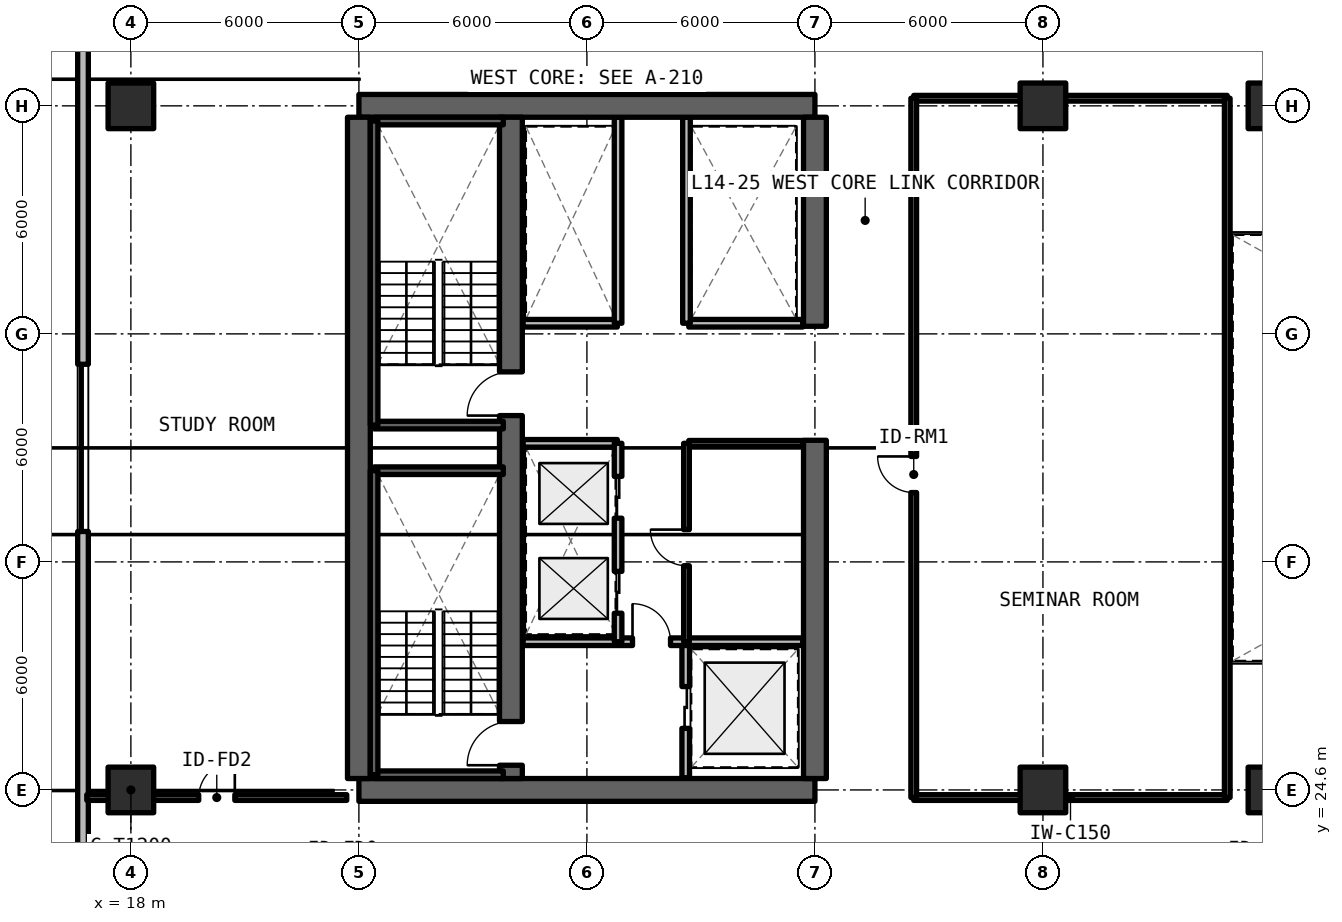
"""IFC4 building model, lengths in metres.
Left out: names, types, materials, properties, quantities, classifications, styles, units other than length and angle.
Written with IfcOpenShell. Run it as: python <this file> out.ifc"""

import sys

from ifc_helpers import new_model, si_unit, direction, frame, frame_2d, origin, origin_2d, place, context, subcontext, project, spatial, rectangle, extrude, element, fill, save


model = new_model("IFC4")
c1 = context("Model", 3, precision=1e-05, world=origin(), true_north=direction((0.0, 1.0)))
c2 = subcontext(c1, "Body", "Model", "MODEL_VIEW")
j1 = project(units=[si_unit("LENGTHUNIT", "METRE"), si_unit("PLANEANGLEUNIT", "RADIAN")], contexts=[c1])
p1 = place(None, origin())
s1 = spatial("IfcSite", under=j1, at=p1, CompositionType="ELEMENT")
p2 = place(p1, origin())
s2 = spatial("IfcBuilding", under=s1, at=p2, CompositionType="ELEMENT")
p3 = place(p2, frame((0.0, 0.0, 52.14)))
s3 = spatial("IfcBuildingStorey", under=s2, at=p3, CompositionType="ELEMENT", Elevation=52.14)
for number, where, z_axis, x_axis in (
    (1, (24.0, 24.6, 0.0), (0.0, 0.0, 1.0), (1.0, 0.0, 0.0)),
    (2, (36.0, 42.6, 0.0), (0.0, 0.0, 1.0), (-1.0, 0.0, 0.0)),
):
    element("IfcWall", number, at=place(p3, frame(where, z_axis=z_axis, x_axis=x_axis)), inside=s3, PredefinedType="SHEAR", context=c2, shape_type="SweptSolid", body=[
        extrude(rectangle(XDim=12.0, YDim=0.6, at=frame_2d((6.0, 0.0))), origin(), (0.0, 0.0, 1.0), 3.3),
    ])
p4 = place(p3, frame((24.0, 24.9, 0.0), z_axis=(0.0, 0.0, 1.0), x_axis=(0.0, 1.0, 0.0)))
e3 = element("IfcWall", 3, at=p4, inside=s3, PredefinedType="SHEAR", context=c2, shape_type="SweptSolid", body=[
    extrude(rectangle(XDim=17.4, YDim=0.6, at=frame_2d((8.7, 0.0))), origin(), (0.0, 0.0, 1.0), 3.3),
])
p5 = place(p3, frame((36.0, 24.9, 0.0), z_axis=(0.0, 0.0, 1.0), x_axis=(0.0, 1.0, 0.0)))
e4 = element("IfcWall", 4, at=p5, inside=s3, PredefinedType="SHEAR", context=c2, shape_type="SweptSolid", body=[
    extrude(rectangle(XDim=8.9, YDim=0.6, at=frame_2d((4.45, 0.0))), origin(), (0.0, 0.0, 1.0), 3.3),
])
p6 = place(p3, frame((36.0, 36.8, 0.0), z_axis=(0.0, 0.0, 1.0), x_axis=(0.0, 1.0, 0.0)))
e5 = element("IfcWall", 5, at=p6, inside=s3, PredefinedType="SHEAR", context=c2, shape_type="SweptSolid", body=[
    extrude(rectangle(XDim=5.5, YDim=0.6, at=frame_2d((2.75, 0.0))), origin(), (0.0, 0.0, 1.0), 3.3),
])
p7 = place(p3, frame((28.0, 24.9, 0.0), z_axis=(0.0, 0.0, 1.0), x_axis=(0.0, 1.0, 0.0)))
e6 = element("IfcWall", 6, at=p7, inside=s3, PredefinedType="SHEAR", context=c2, shape_type="SweptSolid", body=[
    extrude(rectangle(XDim=17.4, YDim=0.6, at=frame_2d((8.7, 0.0))), origin(), (0.0, 0.0, 1.0), 3.3),
])
p8 = place(p7, frame((0.35, 0.0, 0.0)))
e7 = element("IfcOpeningElement", 7, at=p8, cuts=e6, PredefinedType="OPENING", context=c2, shape_type="SweptSolid", body=[
    extrude(rectangle(XDim=1.15, YDim=2.15, at=frame_2d((0.575, 1.075))), frame((0.0, 0.31, 0.0), z_axis=(0.0, -1.0, 0.0), x_axis=(1.0, 0.0, 0.0)), (0.0, 0.0, 1.0), 0.62),
])
p9 = place(p7, frame((9.55, 0.0, 0.0)))
e8 = element("IfcOpeningElement", 8, at=p9, cuts=e6, PredefinedType="OPENING", context=c2, shape_type="SweptSolid", body=[
    extrude(rectangle(XDim=1.15, YDim=2.15, at=frame_2d((0.575, 1.075))), frame((0.0, 0.31, 0.0), z_axis=(0.0, -1.0, 0.0), x_axis=(1.0, 0.0, 0.0)), (0.0, 0.0, 1.0), 0.62),
])
for number, where, z_axis, x_axis in (
    (9, (18.0, 24.6, 0.0), (0.0, 0.0, 1.0), (1.0, 0.0, 0.0)),
    (10, (18.0, 42.6, 0.0), (0.0, 0.0, 1.0), (1.0, 0.0, 0.0)),
    (11, (42.0, 24.6, 0.0), (0.0, 0.0, 1.0), (1.0, 0.0, 0.0)),
    (12, (42.0, 42.6, 0.0), (0.0, 0.0, 1.0), (1.0, 0.0, 0.0)),
    (13, (48.0, 24.6, 0.0), (0.0, 0.0, 1.0), (1.0, 0.0, 0.0)),
    (14, (48.0, 42.6, 0.0), (0.0, 0.0, 1.0), (1.0, 0.0, 0.0)),
):
    element("IfcColumn", number, at=place(p3, frame(where, z_axis=z_axis, x_axis=x_axis)), inside=s3, PredefinedType="COLUMN", context=c2, shape_type="SweptSolid", body=[
        extrude(rectangle(XDim=1.2, YDim=1.2, at=origin_2d()), origin(), (0.0, 0.0, 1.0), 3.3),
    ])
p10 = place(p3, frame((16.74, 55.342, 0.0), z_axis=(0.0, 0.0, 1.0), x_axis=(0.0, -1.0, 0.0)))
e15 = element("IfcWall", 15, at=p10, inside=s3, PredefinedType="SOLIDWALL", context=c2, shape_type="SweptSolid", body=[
    extrude(rectangle(XDim=43.484, YDim=0.28, at=frame_2d((21.742, 0.0))), origin(), (0.0, 0.0, 1.0), 3.08),
])
p11 = place(p10, frame((3.442, 0.0, 0.0)))
e16 = element("IfcOpeningElement", 16, at=p11, cuts=e15, PredefinedType="OPENING", context=c2, shape_type="SweptSolid", body=[
    extrude(rectangle(XDim=1.1, YDim=2.15, at=frame_2d((0.55, 1.075))), frame((0.0, 0.15, 0.0), z_axis=(0.0, -1.0, 0.0), x_axis=(1.0, 0.0, 0.0)), (0.0, 0.0, 1.0), 0.3),
])
p12 = place(p10, frame((19.542, 0.0, 0.78)))
e17 = element("IfcOpeningElement", 17, at=p12, cuts=e15, PredefinedType="OPENING", context=c2, shape_type="SweptSolid", body=[
    extrude(rectangle(XDim=4.4, YDim=1.66, at=frame_2d((2.2, 0.83))), frame((0.0, 0.15, 0.0), z_axis=(0.0, -1.0, 0.0), x_axis=(1.0, 0.0, 0.0)), (0.0, 0.0, 1.0), 0.3),
])
p13 = place(p10, frame((37.573, 0.0, 0.78)))
e18 = element("IfcOpeningElement", 18, at=p13, cuts=e15, PredefinedType="OPENING", context=c2, shape_type="SweptSolid", body=[
    extrude(rectangle(XDim=4.4, YDim=1.66, at=frame_2d((2.2, 0.83))), frame((0.0, 0.15, 0.0), z_axis=(0.0, -1.0, 0.0), x_axis=(1.0, 0.0, 0.0)), (0.0, 0.0, 1.0), 0.3),
])
p14 = place(p3, frame((32.6, 24.92, 0.0), z_axis=(0.0, 0.0, 1.0), x_axis=(0.0, 1.0, 0.0)))
e19 = element("IfcWall", 19, at=p14, inside=s3, PredefinedType="SOLIDWALL", context=c2, shape_type="SweptSolid", body=[
    extrude(rectangle(XDim=3.58, YDim=0.2, at=frame_2d((1.79, 0.0))), origin(), (0.0, 0.0, 1.0), 2.35),
])
p15 = place(p14, frame((1.3, 0.0, 0.0)))
e20 = element("IfcOpeningElement", 20, at=p15, cuts=e19, PredefinedType="OPENING", context=c2, shape_type="SweptSolid", body=[
    extrude(rectangle(XDim=1.1, YDim=2.2, at=frame_2d((0.55, 1.1))), frame((0.0, 0.11, 0.0), z_axis=(0.0, -1.0, 0.0), x_axis=(1.0, 0.0, 0.0)), (0.0, 0.0, 1.0), 0.22),
])
p16 = place(p3, frame((28.32, 28.5, 0.0), z_axis=(0.0, 0.0, 1.0), x_axis=(1.0, 0.0, 0.0)))
e21 = element("IfcWall", 21, at=p16, inside=s3, PredefinedType="SOLIDWALL", context=c2, shape_type="SweptSolid", body=[
    extrude(rectangle(XDim=7.36, YDim=0.2, at=frame_2d((3.68, 0.0))), origin(), (0.0, 0.0, 1.0), 2.35),
])
p17 = place(p16, frame((2.88, 0.0, 0.0)))
e22 = element("IfcOpeningElement", 22, at=p17, cuts=e21, PredefinedType="OPENING", context=c2, shape_type="SweptSolid", body=[
    extrude(rectangle(XDim=1.0, YDim=2.15, at=frame_2d((0.5, 1.075))), frame((0.0, 0.11, 0.0), z_axis=(0.0, -1.0, 0.0), x_axis=(1.0, 0.0, 0.0)), (0.0, 0.0, 1.0), 0.22),
])
p18 = place(p3, frame((28.32, 33.72, 0.0), z_axis=(0.0, 0.0, 1.0), x_axis=(1.0, 0.0, 0.0)))
e23 = element("IfcWall", 23, at=p18, inside=s3, PredefinedType="SOLIDWALL", context=c2, shape_type="SweptSolid", body=[
    extrude(rectangle(XDim=2.48, YDim=0.2, at=frame_2d((1.24, 0.0))), origin(), (0.0, 0.0, 1.0), 2.35),
])
p19 = place(p3, frame((30.82, 28.5, 0.0), z_axis=(0.0, 0.0, 1.0), x_axis=(0.0, 1.0, 0.0)))
e24 = element("IfcWall", 24, at=p19, inside=s3, PredefinedType="SOLIDWALL", context=c2, shape_type="SweptSolid", body=[
    extrude(rectangle(XDim=5.22, YDim=0.2, at=frame_2d((2.61, 0.0))), origin(), (0.0, 0.0, 1.0), 2.35),
])
p20 = place(p19, frame((0.75, 0.0, 0.0)))
e25 = element("IfcOpeningElement", 25, at=p20, cuts=e24, PredefinedType="OPENING", context=c2, shape_type="SweptSolid", body=[
    extrude(rectangle(XDim=1.1, YDim=2.2, at=frame_2d((0.55, 1.1))), frame((0.0, 0.11, 0.0), z_axis=(0.0, -1.0, 0.0), x_axis=(1.0, 0.0, 0.0)), (0.0, 0.0, 1.0), 0.22),
])
p21 = place(p19, frame((3.25, 0.0, 0.0)))
e26 = element("IfcOpeningElement", 26, at=p21, cuts=e24, PredefinedType="OPENING", context=c2, shape_type="SweptSolid", body=[
    extrude(rectangle(XDim=1.1, YDim=2.2, at=frame_2d((0.55, 1.1))), frame((0.0, 0.11, 0.0), z_axis=(0.0, -1.0, 0.0), x_axis=(1.0, 0.0, 0.0)), (0.0, 0.0, 1.0), 0.22),
])
p22 = place(p3, frame((32.68, 33.72, 0.0), z_axis=(0.0, 0.0, 1.0), x_axis=(1.0, 0.0, 0.0)))
e27 = element("IfcWall", 27, at=p22, inside=s3, PredefinedType="SOLIDWALL", context=c2, shape_type="SweptSolid", body=[
    extrude(rectangle(XDim=3.0, YDim=0.15, at=frame_2d((1.5, 0.0))), origin(), (0.0, 0.0, 1.0), 2.35),
])
p23 = place(p3, frame((32.62, 28.5, 0.0), z_axis=(0.0, 0.0, 1.0), x_axis=(0.0, 1.0, 0.0)))
e28 = element("IfcWall", 28, at=p23, inside=s3, PredefinedType="SOLIDWALL", context=c2, shape_type="SweptSolid", body=[
    extrude(rectangle(XDim=5.22, YDim=0.15, at=frame_2d((2.61, 0.0))), origin(), (0.0, 0.0, 1.0), 2.35),
])
p24 = place(p23, frame((2.0, 0.0, 0.0)))
e29 = element("IfcOpeningElement", 29, at=p24, cuts=e28, PredefinedType="OPENING", context=c2, shape_type="SweptSolid", body=[
    extrude(rectangle(XDim=0.95, YDim=2.15, at=frame_2d((0.475, 1.075))), frame((0.0, 0.085, 0.0), z_axis=(0.0, -1.0, 0.0), x_axis=(1.0, 0.0, 0.0)), (0.0, 0.0, 1.0), 0.17),
])
p25 = place(p3, frame((28.32, 36.88, 0.0), z_axis=(0.0, 0.0, 1.0), x_axis=(1.0, 0.0, 0.0)))
e30 = element("IfcWall", 30, at=p25, inside=s3, PredefinedType="SOLIDWALL", context=c2, shape_type="SweptSolid", body=[
    extrude(rectangle(XDim=2.48, YDim=0.2, at=frame_2d((1.24, 0.0))), origin(), (0.0, 0.0, 1.0), 2.35),
])
p26 = place(p3, frame((30.82, 36.88, 0.0), z_axis=(0.0, 0.0, 1.0), x_axis=(0.0, 1.0, 0.0)))
e31 = element("IfcWall", 31, at=p26, inside=s3, PredefinedType="SOLIDWALL", context=c2, shape_type="SweptSolid", body=[
    extrude(rectangle(XDim=5.42, YDim=0.2, at=frame_2d((2.71, 0.0))), origin(), (0.0, 0.0, 1.0), 2.35),
])
p27 = place(p3, frame((32.68, 36.88, 0.0), z_axis=(0.0, 0.0, 1.0), x_axis=(1.0, 0.0, 0.0)))
e32 = element("IfcWall", 32, at=p27, inside=s3, PredefinedType="SOLIDWALL", context=c2, shape_type="SweptSolid", body=[
    extrude(rectangle(XDim=3.0, YDim=0.2, at=frame_2d((1.5, 0.0))), origin(), (0.0, 0.0, 1.0), 2.35),
])
p28 = place(p3, frame((32.62, 36.88, 0.0), z_axis=(0.0, 0.0, 1.0), x_axis=(0.0, 1.0, 0.0)))
e33 = element("IfcWall", 33, at=p28, inside=s3, PredefinedType="SOLIDWALL", context=c2, shape_type="SweptSolid", body=[
    extrude(rectangle(XDim=5.42, YDim=0.2, at=frame_2d((2.71, 0.0))), origin(), (0.0, 0.0, 1.0), 2.35),
])
for number, where, z_axis, x_axis in (
    (34, (38.6, 24.4, 0.0), (0.0, 0.0, 1.0), (1.0, 0.0, 0.0)),
    (35, (38.6, 42.8, 0.0), (0.0, 0.0, 1.0), (1.0, 0.0, 0.0)),
):
    element("IfcWall", number, at=place(p3, frame(where, z_axis=z_axis, x_axis=x_axis)), inside=s3, PredefinedType="SOLIDWALL", context=c2, shape_type="SweptSolid", body=[
        extrude(rectangle(XDim=8.25, YDim=0.15, at=frame_2d((4.125, 0.0))), origin(), (0.0, 0.0, 1.0), 2.295),
    ])
p29 = place(p3, frame((38.6, 24.4, 0.0), z_axis=(0.0, 0.0, 1.0), x_axis=(0.0, 1.0, 0.0)))
e36 = element("IfcWall", 36, at=p29, inside=s3, PredefinedType="SOLIDWALL", context=c2, shape_type="SweptSolid", body=[
    extrude(rectangle(XDim=18.4, YDim=0.15, at=frame_2d((9.2, 0.0))), origin(), (0.0, 0.0, 1.0), 2.35),
])
p30 = place(p29, frame((8.025, 0.0, 0.0)))
e37 = element("IfcOpeningElement", 37, at=p30, cuts=e36, PredefinedType="OPENING", context=c2, shape_type="SweptSolid", body=[
    extrude(rectangle(XDim=0.95, YDim=2.15, at=frame_2d((0.475, 1.075))), frame((0.0, 0.085, 0.0), z_axis=(0.0, -1.0, 0.0), x_axis=(1.0, 0.0, 0.0)), (0.0, 0.0, 1.0), 0.17),
])
p31 = place(p3, frame((46.85, 24.4, 0.0), z_axis=(0.0, 0.0, 1.0), x_axis=(0.0, 1.0, 0.0)))
e38 = element("IfcWall", 38, at=p31, inside=s3, PredefinedType="SOLIDWALL", context=c2, shape_type="SweptSolid", body=[
    extrude(rectangle(XDim=18.4, YDim=0.15, at=frame_2d((9.2, 0.0))), origin(), (0.0, 0.0, 1.0), 2.35),
])
p32 = place(p3, frame((16.84, 24.4, 0.0), z_axis=(0.0, 0.0, 1.0), x_axis=(1.0, 0.0, 0.0)))
e39 = element("IfcWall", 39, at=p32, inside=s3, PredefinedType="SOLIDWALL", context=c2, shape_type="SweptSolid", body=[
    extrude(rectangle(XDim=6.84, YDim=0.15, at=frame_2d((3.42, 0.0))), origin(), (0.0, 0.0, 1.0), 2.295),
])
p33 = place(p32, frame((2.945, 0.0, 0.0)))
e40 = element("IfcOpeningElement", 40, at=p33, cuts=e39, PredefinedType="OPENING", context=c2, shape_type="SweptSolid", body=[
    extrude(rectangle(XDim=0.95, YDim=2.15, at=frame_2d((0.475, 1.075))), frame((0.0, 0.085, 0.0), z_axis=(0.0, -1.0, 0.0), x_axis=(1.0, 0.0, 0.0)), (0.0, 0.0, 1.0), 0.17),
])
for number, where, z_axis, x_axis in (
    (41, (24.4, 25.0, 0.0), (0.0, 0.0, 1.0), (1.0, 0.0, 0.0)),
    (42, (27.8, 33.0, 0.0), (0.0, 0.0, 1.0), (-1.0, 0.0, 0.0)),
):
    element("IfcWall", number, at=place(p3, frame(where, z_axis=z_axis, x_axis=x_axis)), inside=s3, PredefinedType="SOLIDWALL", context=c2, shape_type="SweptSolid", body=[
        extrude(rectangle(XDim=3.4, YDim=0.2, at=frame_2d((1.7, 0.0))), origin(), (0.0, 0.0, 1.0), 3.3),
    ])
p34 = place(p3, frame((24.4, 33.0, 0.0), z_axis=(0.0, 0.0, 1.0), x_axis=(0.0, -1.0, 0.0)))
e43 = element("IfcWall", 43, at=p34, inside=s3, PredefinedType="SOLIDWALL", context=c2, shape_type="SweptSolid", body=[
    extrude(rectangle(XDim=8.0, YDim=0.2, at=frame_2d((4.0, 0.0))), origin(), (0.0, 0.0, 1.0), 3.3),
])
for number, where, z_axis, x_axis in (
    (44, (24.4, 34.2, 0.0), (0.0, 0.0, 1.0), (1.0, 0.0, 0.0)),
    (45, (27.8, 42.2, 0.0), (0.0, 0.0, 1.0), (-1.0, 0.0, 0.0)),
):
    element("IfcWall", number, at=place(p3, frame(where, z_axis=z_axis, x_axis=x_axis)), inside=s3, PredefinedType="SOLIDWALL", context=c2, shape_type="SweptSolid", body=[
        extrude(rectangle(XDim=3.4, YDim=0.2, at=frame_2d((1.7, 0.0))), origin(), (0.0, 0.0, 1.0), 3.3),
    ])
p35 = place(p3, frame((24.4, 42.2, 0.0), z_axis=(0.0, 0.0, 1.0), x_axis=(0.0, -1.0, 0.0)))
e46 = element("IfcWall", 46, at=p35, inside=s3, PredefinedType="SOLIDWALL", context=c2, shape_type="SweptSolid", body=[
    extrude(rectangle(XDim=8.0, YDim=0.2, at=frame_2d((4.0, 0.0))), origin(), (0.0, 0.0, 1.0), 3.3),
])
p36 = place(p12, origin())
e47 = element("IfcWindow", 47, at=p36, inside=s3, PartitioningType="SINGLE_PANEL", PredefinedType="WINDOW", context=c2, shape_type="SweptSolid", body=[
    extrude(rectangle(XDim=4.4, YDim=1.66, at=frame_2d((2.2, 0.83))), frame((0.0, 0.03, 0.0), z_axis=(0.0, -1.0, 0.0), x_axis=(1.0, 0.0, 0.0)), (0.0, 0.0, 1.0), 0.06),
])
fill(e17, e47)
p37 = place(p15, origin())
e48 = element("IfcDoor", 48, at=p37, inside=s3, OperationType="SLIDING_TO_LEFT", PredefinedType="DOOR", context=c2, shape_type="SweptSolid", body=[
    extrude(rectangle(XDim=1.1, YDim=2.2, at=frame_2d((0.55, 1.1))), frame((0.0, 0.025, 0.0), z_axis=(0.0, -1.0, 0.0), x_axis=(1.0, 0.0, 0.0)), (0.0, 0.0, 1.0), 0.05),
])
fill(e20, e48)
p38 = place(p17, origin())
e49 = element("IfcDoor", 49, at=p38, inside=s3, OperationType="SINGLE_SWING_LEFT", PredefinedType="DOOR", context=c2, shape_type="SweptSolid", body=[
    extrude(rectangle(XDim=1.0, YDim=2.15, at=frame_2d((0.5, 1.075))), frame((0.0, 0.025, 0.0), z_axis=(0.0, -1.0, 0.0), x_axis=(1.0, 0.0, 0.0)), (0.0, 0.0, 1.0), 0.05),
])
fill(e22, e49)
p39 = place(p20, origin())
e50 = element("IfcDoor", 50, at=p39, inside=s3, OperationType="SLIDING_TO_LEFT", PredefinedType="DOOR", context=c2, shape_type="SweptSolid", body=[
    extrude(rectangle(XDim=1.1, YDim=2.2, at=frame_2d((0.55, 1.1))), frame((0.0, 0.025, 0.0), z_axis=(0.0, -1.0, 0.0), x_axis=(1.0, 0.0, 0.0)), (0.0, 0.0, 1.0), 0.05),
])
fill(e25, e50)
p40 = place(p21, origin())
e51 = element("IfcDoor", 51, at=p40, inside=s3, OperationType="SLIDING_TO_RIGHT", PredefinedType="DOOR", context=c2, shape_type="SweptSolid", body=[
    extrude(rectangle(XDim=1.1, YDim=2.2, at=frame_2d((0.55, 1.1))), frame((0.0, 0.025, 0.0), z_axis=(0.0, -1.0, 0.0), x_axis=(1.0, 0.0, 0.0)), (0.0, 0.0, 1.0), 0.05),
])
fill(e26, e51)
p41 = place(p24, origin())
e52 = element("IfcDoor", 52, at=p41, inside=s3, OperationType="SINGLE_SWING_RIGHT", PredefinedType="DOOR", context=c2, shape_type="SweptSolid", body=[
    extrude(rectangle(XDim=0.95, YDim=2.15, at=frame_2d((0.475, 1.075))), frame((0.0, 0.025, 0.0), z_axis=(0.0, -1.0, 0.0), x_axis=(1.0, 0.0, 0.0)), (0.0, 0.0, 1.0), 0.05),
])
fill(e29, e52)
p42 = place(p30, origin())
e53 = element("IfcDoor", 53, at=p42, inside=s3, OperationType="SINGLE_SWING_RIGHT", PredefinedType="DOOR", context=c2, shape_type="SweptSolid", body=[
    extrude(rectangle(XDim=0.95, YDim=2.15, at=frame_2d((0.475, 1.075))), frame((0.0, 0.025, 0.0), z_axis=(0.0, -1.0, 0.0), x_axis=(1.0, 0.0, 0.0)), (0.0, 0.0, 1.0), 0.05),
])
fill(e37, e53)
p43 = place(p33, origin())
e54 = element("IfcDoor", 54, at=p43, inside=s3, OperationType="SINGLE_SWING_RIGHT", PredefinedType="DOOR", context=c2, shape_type="SweptSolid", body=[
    extrude(rectangle(XDim=0.95, YDim=2.15, at=frame_2d((0.475, 1.075))), frame((0.0, 0.025, 0.0), z_axis=(0.0, -1.0, 0.0), x_axis=(1.0, 0.0, 0.0)), (0.0, 0.0, 1.0), 0.05),
])
fill(e40, e54)
p44 = place(p8, origin())
e55 = element("IfcDoor", 55, at=p44, inside=s3, OperationType="SINGLE_SWING_LEFT", PredefinedType="DOOR", context=c2, shape_type="SweptSolid", body=[
    extrude(rectangle(XDim=1.15, YDim=2.15, at=frame_2d((0.575, 1.075))), frame((0.0, 0.025, 0.0), z_axis=(0.0, -1.0, 0.0), x_axis=(1.0, 0.0, 0.0)), (0.0, 0.0, 1.0), 0.05),
])
fill(e7, e55)
p45 = place(p9, origin())
e56 = element("IfcDoor", 56, at=p45, inside=s3, OperationType="SINGLE_SWING_RIGHT", PredefinedType="DOOR", context=c2, shape_type="SweptSolid", body=[
    extrude(rectangle(XDim=1.15, YDim=2.15, at=frame_2d((0.575, 1.075))), frame((0.0, 0.025, 0.0), z_axis=(0.0, -1.0, 0.0), x_axis=(1.0, 0.0, 0.0)), (0.0, 0.0, 1.0), 0.05),
])
fill(e8, e56)
save(model, sys.argv[1])
